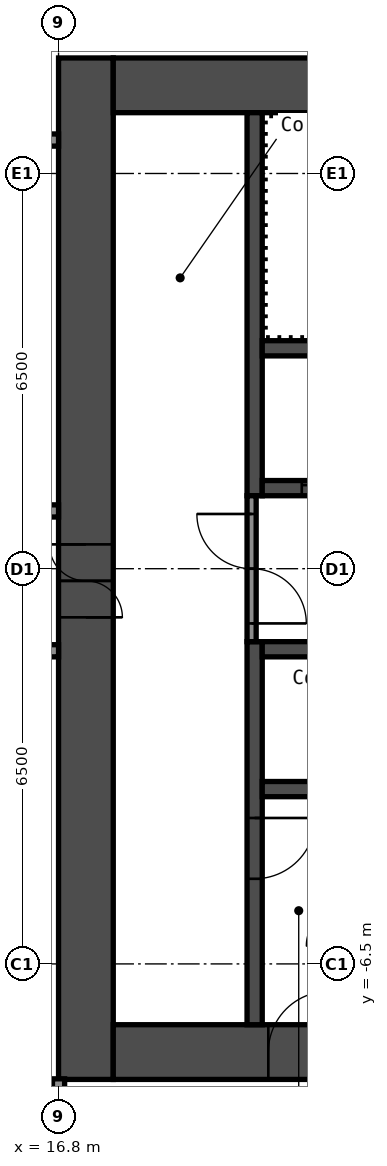
"""IFC4 building model, lengths in metres.
Left out: names, types, materials, properties, quantities, classifications, styles, units other than length and angle.
Written with IfcOpenShell. Run it as: python <this file> out.ifc"""

import sys

from ifc_helpers import new_model, si_unit, direction, frame, frame_2d, origin, place, context, subcontext, project, spatial, rectangle, extrude, element, fill, save


model = new_model("IFC4")
c1 = context("Model", 3, precision=1e-05, world=origin(), true_north=direction((0.0, 1.0)))
c2 = subcontext(c1, "Body", "Model", "MODEL_VIEW")
j1 = project(units=[si_unit("LENGTHUNIT", "METRE"), si_unit("PLANEANGLEUNIT", "RADIAN")], contexts=[c1])
p1 = place(None, origin())
s1 = spatial("IfcSite", under=j1, at=p1, CompositionType="ELEMENT")
p2 = place(p1, origin())
s2 = spatial("IfcBuilding", under=s1, at=p2, CompositionType="ELEMENT")
p3 = place(p2, frame((0.0, 0.0, 101.0)))
s3 = spatial("IfcBuildingStorey", under=s2, at=p3, CompositionType="ELEMENT", Elevation=101.0)
p4 = place(p3, frame((17.25, -8.4, 0.0), z_axis=(0.0, 0.0, 1.0), x_axis=(0.0, 1.0, 0.0)))
e1 = element("IfcWall", 1, at=p4, inside=s3, PredefinedType="SHEAR", context=c2, shape_type="SweptSolid", body=[
    extrude(rectangle(XDim=16.8, YDim=0.9, at=frame_2d((8.4, 0.0))), origin(), (0.0, 0.0, 1.0), 2.8),
])
p5 = place(p4, frame((7.6, 0.0, 0.0)))
e2 = element("IfcOpeningElement", 2, at=p5, cuts=e1, PredefinedType="OPENING", context=c2, shape_type="SweptSolid", body=[
    extrude(rectangle(XDim=1.2, YDim=2.1, at=frame_2d((0.6, 1.05))), frame((0.0, 0.46, 0.0), z_axis=(0.0, -1.0, 0.0), x_axis=(1.0, 0.0, 0.0)), (0.0, 0.0, 1.0), 0.92),
])
p6 = place(p3, frame((17.7, 7.95, 0.0), z_axis=(0.0, 0.0, 1.0), x_axis=(1.0, 0.0, 0.0)))
e3 = element("IfcWall", 3, at=p6, inside=s3, PredefinedType="SHEAR", context=c2, shape_type="SweptSolid", body=[
    extrude(rectangle(XDim=15.0, YDim=0.9, at=frame_2d((7.5, 0.0))), origin(), (0.0, 0.0, 1.0), 2.8),
])
p7 = place(p6, frame((10.4, 0.0, 0.0)))
e4 = element("IfcOpeningElement", 4, at=p7, cuts=e3, PredefinedType="OPENING", context=c2, shape_type="SweptSolid", body=[
    extrude(rectangle(XDim=1.2, YDim=2.1, at=frame_2d((0.6, 1.05))), frame((0.0, 0.46, 0.0), z_axis=(0.0, -1.0, 0.0), x_axis=(1.0, 0.0, 0.0)), (0.0, 0.0, 1.0), 0.92),
])
p8 = place(p6, frame((13.35, 0.0, 0.0)))
e5 = element("IfcOpeningElement", 5, at=p8, cuts=e3, PredefinedType="OPENING", context=c2, shape_type="SweptSolid", body=[
    extrude(rectangle(XDim=0.9, YDim=2.1, at=frame_2d((0.45, 1.05))), frame((0.0, 0.46, 0.0), z_axis=(0.0, -1.0, 0.0), x_axis=(1.0, 0.0, 0.0)), (0.0, 0.0, 1.0), 0.92),
])
p9 = place(p3, frame((17.7, -7.95, 0.0), z_axis=(0.0, 0.0, 1.0), x_axis=(1.0, 0.0, 0.0)))
e6 = element("IfcWall", 6, at=p9, inside=s3, PredefinedType="SHEAR", context=c2, shape_type="SweptSolid", body=[
    extrude(rectangle(XDim=15.0, YDim=0.9, at=frame_2d((7.5, 0.0))), origin(), (0.0, 0.0, 1.0), 2.8),
])
p10 = place(p9, frame((2.55, 0.0, 0.0)))
e7 = element("IfcOpeningElement", 7, at=p10, cuts=e6, PredefinedType="OPENING", context=c2, shape_type="SweptSolid", body=[
    extrude(rectangle(XDim=1.0, YDim=2.1, at=frame_2d((0.5, 1.05))), frame((0.0, 0.46, 0.0), z_axis=(0.0, -1.0, 0.0), x_axis=(1.0, 0.0, 0.0)), (0.0, 0.0, 1.0), 0.92),
])
p11 = place(p3, frame((20.025, 1.2, 0.0), z_axis=(0.0, 0.0, 1.0), x_axis=(0.0, 1.0, 0.0)))
e8 = element("IfcWall", 8, at=p11, inside=s3, PredefinedType="SHEAR", context=c2, shape_type="SweptSolid", body=[
    extrude(rectangle(XDim=6.3, YDim=0.25, at=frame_2d((3.15, 0.0))), origin(), (0.0, 0.0, 1.0), 2.8),
])
p12 = place(p3, frame((20.025, -7.5, 0.0), z_axis=(0.0, 0.0, 1.0), x_axis=(0.0, 1.0, 0.0)))
e9 = element("IfcWall", 9, at=p12, inside=s3, PredefinedType="SHEAR", context=c2, shape_type="SweptSolid", body=[
    extrude(rectangle(XDim=6.3, YDim=0.25, at=frame_2d((3.15, 0.0))), origin(), (0.0, 0.0, 1.0), 2.8),
])
p13 = place(p12, frame((2.4, 0.0, 0.0)))
e10 = element("IfcOpeningElement", 10, at=p13, cuts=e9, PredefinedType="OPENING", context=c2, shape_type="SweptSolid", body=[
    extrude(rectangle(XDim=1.0, YDim=2.1, at=frame_2d((0.5, 1.05))), frame((0.0, 0.135, 0.0), z_axis=(0.0, -1.0, 0.0), x_axis=(1.0, 0.0, 0.0)), (0.0, 0.0, 1.0), 0.27),
])
p14 = place(p3, frame((20.15, 1.325, 0.0), z_axis=(0.0, 0.0, 1.0), x_axis=(1.0, 0.0, 0.0)))
e11 = element("IfcWall", 11, at=p14, inside=s3, PredefinedType="SHEAR", context=c2, shape_type="SweptSolid", body=[
    extrude(rectangle(XDim=7.5, YDim=0.25, at=frame_2d((3.75, 0.0))), origin(), (0.0, 0.0, 1.0), 2.8),
])
p15 = place(p14, frame((0.65, 0.0, 0.0)))
e12 = element("IfcOpeningElement", 12, at=p15, cuts=e11, PredefinedType="OPENING", context=c2, shape_type="SweptSolid", body=[
    extrude(rectangle(XDim=1.1, YDim=2.1, at=frame_2d((0.55, 1.05))), frame((0.0, 0.135, 0.0), z_axis=(0.0, -1.0, 0.0), x_axis=(1.0, 0.0, 0.0)), (0.0, 0.0, 1.0), 0.27),
])
p16 = place(p14, frame((3.05, 0.0, 0.0)))
e13 = element("IfcOpeningElement", 13, at=p16, cuts=e11, PredefinedType="OPENING", context=c2, shape_type="SweptSolid", body=[
    extrude(rectangle(XDim=1.1, YDim=2.1, at=frame_2d((0.55, 1.05))), frame((0.0, 0.135, 0.0), z_axis=(0.0, -1.0, 0.0), x_axis=(1.0, 0.0, 0.0)), (0.0, 0.0, 1.0), 0.27),
])
p17 = place(p14, frame((5.45, 0.0, 0.0)))
e14 = element("IfcOpeningElement", 14, at=p17, cuts=e11, PredefinedType="OPENING", context=c2, shape_type="SweptSolid", body=[
    extrude(rectangle(XDim=1.1, YDim=2.1, at=frame_2d((0.55, 1.05))), frame((0.0, 0.135, 0.0), z_axis=(0.0, -1.0, 0.0), x_axis=(1.0, 0.0, 0.0)), (0.0, 0.0, 1.0), 0.27),
])
for number, where, z_axis, x_axis in (
    (15, (20.15, 3.625, 0.0), (0.0, 0.0, 1.0), (1.0, 0.0, 0.0)),
    (16, (20.15, -1.325, 0.0), (0.0, 0.0, 1.0), (1.0, 0.0, 0.0)),
    (17, (20.15, -3.625, 0.0), (0.0, 0.0, 1.0), (1.0, 0.0, 0.0)),
):
    element("IfcWall", number, at=place(p3, frame(where, z_axis=z_axis, x_axis=x_axis)), inside=s3, PredefinedType="SHEAR", context=c2, shape_type="SweptSolid", body=[
        extrude(rectangle(XDim=7.5, YDim=0.25, at=frame_2d((3.75, 0.0))), origin(), (0.0, 0.0, 1.0), 2.8),
    ])
p18 = place(p3, frame((19.975, -1.2, 0.0), z_axis=(0.0, 0.0, 1.0), x_axis=(0.0, 1.0, 0.0)))
e18 = element("IfcWall", 18, at=p18, inside=s3, PredefinedType="PARTITIONING", context=c2, shape_type="SweptSolid", body=[
    extrude(rectangle(XDim=2.4, YDim=0.15, at=frame_2d((1.2, 0.0))), origin(), (0.0, 0.0, 1.0), 2.8),
])
p19 = place(p18, frame((0.3, 0.0, 0.0)))
e19 = element("IfcOpeningElement", 19, at=p19, cuts=e18, PredefinedType="OPENING", context=c2, shape_type="SweptSolid", body=[
    extrude(rectangle(XDim=1.8, YDim=2.1, at=frame_2d((0.9, 1.05))), frame((0.0, 0.085, 0.0), z_axis=(0.0, -1.0, 0.0), x_axis=(1.0, 0.0, 0.0)), (0.0, 0.0, 1.0), 0.17),
])
p20 = place(p3, frame((-16.8, -1.35, 0.0), z_axis=(0.0, 0.0, 1.0), x_axis=(1.0, 0.0, 0.0)))
e20 = element("IfcWall", 20, at=p20, inside=s3, PredefinedType="PARTITIONING", context=c2, shape_type="SweptSolid", body=[
    extrude(rectangle(XDim=33.6, YDim=0.2, at=frame_2d((16.8, 0.0))), origin(), (0.0, 0.0, 1.0), 2.8),
])
p21 = place(p20, frame((2.85, 0.0, 0.0)))
e21 = element("IfcOpeningElement", 21, at=p21, cuts=e20, PredefinedType="OPENING", context=c2, shape_type="SweptSolid", body=[
    extrude(rectangle(XDim=1.0, YDim=2.1, at=frame_2d((0.5, 1.05))), frame((0.0, 0.11, 0.0), z_axis=(0.0, -1.0, 0.0), x_axis=(1.0, 0.0, 0.0)), (0.0, 0.0, 1.0), 0.22),
])
p22 = place(p20, frame((4.55, 0.0, 0.0)))
e22 = element("IfcOpeningElement", 22, at=p22, cuts=e20, PredefinedType="OPENING", context=c2, shape_type="SweptSolid", body=[
    extrude(rectangle(XDim=1.0, YDim=2.1, at=frame_2d((0.5, 1.05))), frame((0.0, 0.11, 0.0), z_axis=(0.0, -1.0, 0.0), x_axis=(1.0, 0.0, 0.0)), (0.0, 0.0, 1.0), 0.22),
])
p23 = place(p20, frame((12.1, 0.0, 0.0)))
e23 = element("IfcOpeningElement", 23, at=p23, cuts=e20, PredefinedType="OPENING", context=c2, shape_type="SweptSolid", body=[
    extrude(rectangle(XDim=1.0, YDim=2.1, at=frame_2d((0.5, 1.05))), frame((0.0, 0.11, 0.0), z_axis=(0.0, -1.0, 0.0), x_axis=(1.0, 0.0, 0.0)), (0.0, 0.0, 1.0), 0.22),
])
p24 = place(p20, frame((19.65, 0.0, 0.0)))
e24 = element("IfcOpeningElement", 24, at=p24, cuts=e20, PredefinedType="OPENING", context=c2, shape_type="SweptSolid", body=[
    extrude(rectangle(XDim=1.0, YDim=2.1, at=frame_2d((0.5, 1.05))), frame((0.0, 0.11, 0.0), z_axis=(0.0, -1.0, 0.0), x_axis=(1.0, 0.0, 0.0)), (0.0, 0.0, 1.0), 0.22),
])
p25 = place(p20, frame((21.35, 0.0, 0.0)))
e25 = element("IfcOpeningElement", 25, at=p25, cuts=e20, PredefinedType="OPENING", context=c2, shape_type="SweptSolid", body=[
    extrude(rectangle(XDim=1.0, YDim=2.1, at=frame_2d((0.5, 1.05))), frame((0.0, 0.11, 0.0), z_axis=(0.0, -1.0, 0.0), x_axis=(1.0, 0.0, 0.0)), (0.0, 0.0, 1.0), 0.22),
])
p26 = place(p20, frame((30.6, 0.0, 0.0)))
e26 = element("IfcOpeningElement", 26, at=p26, cuts=e20, PredefinedType="OPENING", context=c2, shape_type="SweptSolid", body=[
    extrude(rectangle(XDim=1.0, YDim=2.1, at=frame_2d((0.5, 1.05))), frame((0.0, 0.11, 0.0), z_axis=(0.0, -1.0, 0.0), x_axis=(1.0, 0.0, 0.0)), (0.0, 0.0, 1.0), 0.22),
])
p27 = place(p3, frame((-16.8, 0.95, 0.0), z_axis=(0.0, 0.0, 1.0), x_axis=(1.0, 0.0, 0.0)))
e27 = element("IfcWall", 27, at=p27, inside=s3, PredefinedType="PARTITIONING", context=c2, shape_type="SweptSolid", body=[
    extrude(rectangle(XDim=33.6, YDim=0.2, at=frame_2d((16.8, 0.0))), origin(), (0.0, 0.0, 1.0), 2.8),
])
p28 = place(p27, frame((10.47, 0.0, 0.0)))
e28 = element("IfcOpeningElement", 28, at=p28, cuts=e27, PredefinedType="OPENING", context=c2, shape_type="SweptSolid", body=[
    extrude(rectangle(XDim=0.9, YDim=2.1, at=frame_2d((0.45, 1.05))), frame((0.0, 0.11, 0.0), z_axis=(0.0, -1.0, 0.0), x_axis=(1.0, 0.0, 0.0)), (0.0, 0.0, 1.0), 0.22),
])
p29 = place(p27, frame((14.67, 0.0, 0.0)))
e29 = element("IfcOpeningElement", 29, at=p29, cuts=e27, PredefinedType="OPENING", context=c2, shape_type="SweptSolid", body=[
    extrude(rectangle(XDim=0.9, YDim=2.1, at=frame_2d((0.45, 1.05))), frame((0.0, 0.11, 0.0), z_axis=(0.0, -1.0, 0.0), x_axis=(1.0, 0.0, 0.0)), (0.0, 0.0, 1.0), 0.22),
])
p30 = place(p27, frame((27.1, 0.0, 0.0)))
e30 = element("IfcOpeningElement", 30, at=p30, cuts=e27, PredefinedType="OPENING", context=c2, shape_type="SweptSolid", body=[
    extrude(rectangle(XDim=0.9, YDim=2.1, at=frame_2d((0.45, 1.05))), frame((0.0, 0.11, 0.0), z_axis=(0.0, -1.0, 0.0), x_axis=(1.0, 0.0, 0.0)), (0.0, 0.0, 1.0), 0.22),
])
p31 = place(p27, frame((31.3, 0.0, 0.0)))
e31 = element("IfcOpeningElement", 31, at=p31, cuts=e27, PredefinedType="OPENING", context=c2, shape_type="SweptSolid", body=[
    extrude(rectangle(XDim=0.9, YDim=2.1, at=frame_2d((0.45, 1.05))), frame((0.0, 0.11, 0.0), z_axis=(0.0, -1.0, 0.0), x_axis=(1.0, 0.0, 0.0)), (0.0, 0.0, 1.0), 0.22),
])
p32 = place(p3, frame((-16.8, 7.05, 0.0), z_axis=(0.0, 0.0, 1.0), x_axis=(1.0, 0.0, 0.0)))
e32 = element("IfcWall", 32, at=p32, inside=s3, PredefinedType="PARTITIONING", context=c2, shape_type="SweptSolid", body=[
    extrude(rectangle(XDim=33.6, YDim=0.2, at=frame_2d((16.8, 0.0))), origin(), (0.0, 0.0, 1.0), 2.8),
])
p33 = place(p32, frame((1.985, 0.0, 0.0)))
e33 = element("IfcOpeningElement", 33, at=p33, cuts=e32, PredefinedType="OPENING", context=c2, shape_type="SweptSolid", body=[
    extrude(rectangle(XDim=0.9, YDim=2.1, at=frame_2d((0.45, 1.05))), frame((0.0, 0.11, 0.0), z_axis=(0.0, -1.0, 0.0), x_axis=(1.0, 0.0, 0.0)), (0.0, 0.0, 1.0), 0.22),
])
p34 = place(p32, frame((6.185, 0.0, 0.0)))
e34 = element("IfcOpeningElement", 34, at=p34, cuts=e32, PredefinedType="OPENING", context=c2, shape_type="SweptSolid", body=[
    extrude(rectangle(XDim=0.9, YDim=2.1, at=frame_2d((0.45, 1.05))), frame((0.0, 0.11, 0.0), z_axis=(0.0, -1.0, 0.0), x_axis=(1.0, 0.0, 0.0)), (0.0, 0.0, 1.0), 0.22),
])
p35 = place(p32, frame((18.115, 0.0, 0.0)))
e35 = element("IfcOpeningElement", 35, at=p35, cuts=e32, PredefinedType="OPENING", context=c2, shape_type="SweptSolid", body=[
    extrude(rectangle(XDim=0.9, YDim=2.1, at=frame_2d((0.45, 1.05))), frame((0.0, 0.11, 0.0), z_axis=(0.0, -1.0, 0.0), x_axis=(1.0, 0.0, 0.0)), (0.0, 0.0, 1.0), 0.22),
])
p36 = place(p32, frame((22.315, 0.0, 0.0)))
e36 = element("IfcOpeningElement", 36, at=p36, cuts=e32, PredefinedType="OPENING", context=c2, shape_type="SweptSolid", body=[
    extrude(rectangle(XDim=0.9, YDim=2.1, at=frame_2d((0.45, 1.05))), frame((0.0, 0.11, 0.0), z_axis=(0.0, -1.0, 0.0), x_axis=(1.0, 0.0, 0.0)), (0.0, 0.0, 1.0), 0.22),
])
p37 = place(p3, frame((16.8, -15.55, 0.0), z_axis=(0.0, 0.0, 1.0), x_axis=(0.0, 1.0, 0.0)))
e37 = element("IfcWall", 37, at=p37, inside=s3, PredefinedType="PARTITIONING", context=c2, shape_type="SweptSolid", body=[
    extrude(rectangle(XDim=7.16, YDim=0.2, at=frame_2d((3.58, 0.0))), origin(), (0.0, 0.0, 1.0), 2.8),
])
p38 = place(p5, origin())
e38 = element("IfcDoor", 38, at=p38, inside=s3, OperationType="DOUBLE_DOOR_SINGLE_SWING", PredefinedType="DOOR", context=c2, shape_type="SweptSolid", body=[
    extrude(rectangle(XDim=1.2, YDim=2.1, at=frame_2d((0.6, 1.05))), frame((0.0, 0.025, 0.0), z_axis=(0.0, -1.0, 0.0), x_axis=(1.0, 0.0, 0.0)), (0.0, 0.0, 1.0), 0.05),
])
fill(e2, e38)
p39 = place(p10, origin())
e39 = element("IfcDoor", 39, at=p39, inside=s3, OperationType="SINGLE_SWING_LEFT", PredefinedType="DOOR", context=c2, shape_type="SweptSolid", body=[
    extrude(rectangle(XDim=1.0, YDim=2.1, at=frame_2d((0.5, 1.05))), frame((0.0, 0.025, 0.0), z_axis=(0.0, -1.0, 0.0), x_axis=(1.0, 0.0, 0.0)), (0.0, 0.0, 1.0), 0.05),
])
fill(e7, e39)
p40 = place(p13, origin())
e40 = element("IfcDoor", 40, at=p40, inside=s3, OperationType="SINGLE_SWING_RIGHT", PredefinedType="DOOR", context=c2, shape_type="SweptSolid", body=[
    extrude(rectangle(XDim=1.0, YDim=2.1, at=frame_2d((0.5, 1.05))), frame((0.0, 0.025, 0.0), z_axis=(0.0, -1.0, 0.0), x_axis=(1.0, 0.0, 0.0)), (0.0, 0.0, 1.0), 0.05),
])
fill(e10, e40)
p41 = place(p19, origin())
e41 = element("IfcDoor", 41, at=p41, inside=s3, OperationType="DOUBLE_DOOR_SINGLE_SWING", PredefinedType="DOOR", context=c2, shape_type="SweptSolid", body=[
    extrude(rectangle(XDim=1.8, YDim=2.1, at=frame_2d((0.9, 1.05))), frame((0.0, 0.025, 0.0), z_axis=(0.0, -1.0, 0.0), x_axis=(1.0, 0.0, 0.0)), (0.0, 0.0, 1.0), 0.05),
])
fill(e19, e41)
p42 = place(p15, origin())
e42 = element("IfcDoor", 42, at=p42, inside=s3, OperationType="DOUBLE_DOOR_SLIDING", PredefinedType="DOOR", context=c2, shape_type="SweptSolid", body=[
    extrude(rectangle(XDim=1.1, YDim=2.1, at=frame_2d((0.55, 1.05))), frame((0.0, 0.025, 0.0), z_axis=(0.0, -1.0, 0.0), x_axis=(1.0, 0.0, 0.0)), (0.0, 0.0, 1.0), 0.05),
])
fill(e12, e42)
save(model, sys.argv[1])
